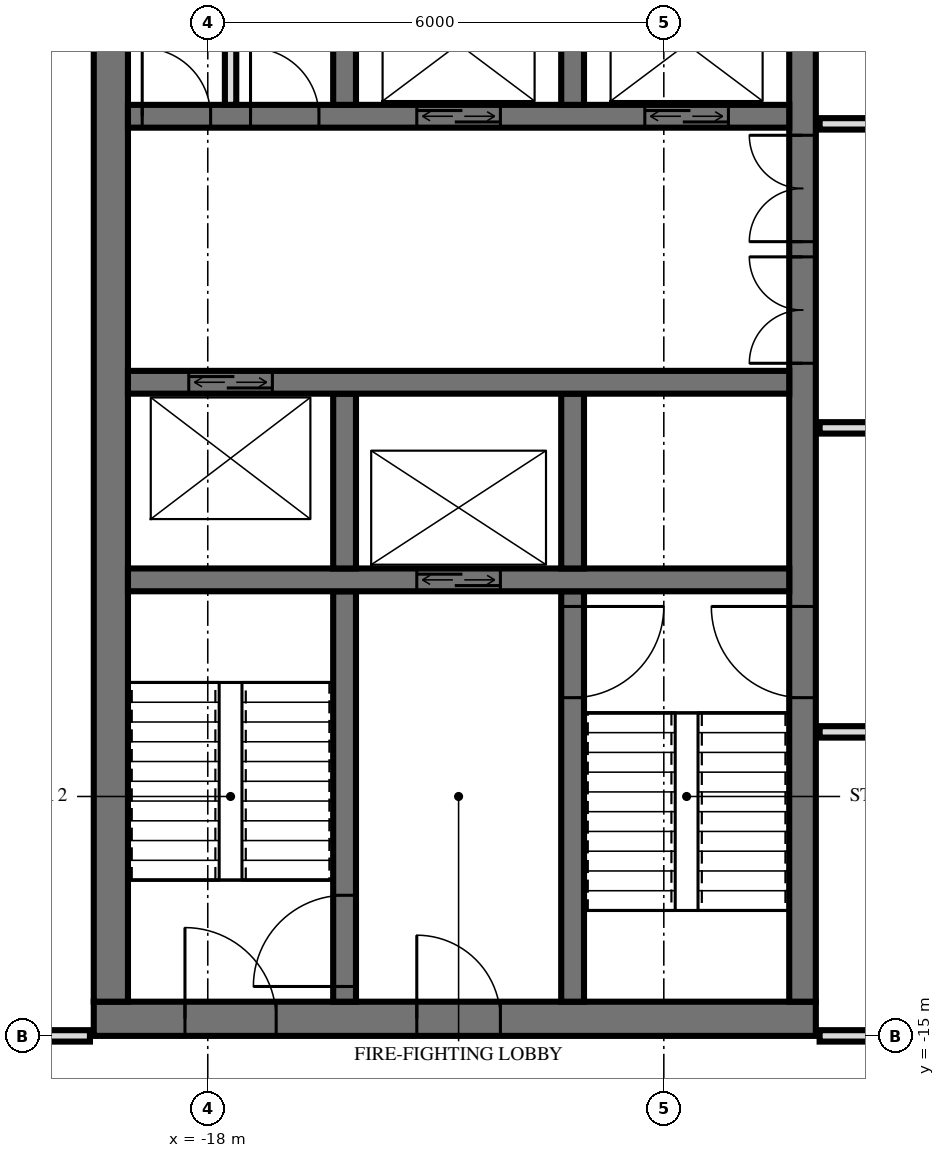
"""IFC4 building model, lengths in metres.
Left out: names, types, materials, properties, quantities, classifications, styles, units other than length and angle.
Written with IfcOpenShell. Run it as: python <this file> out.ifc"""

import sys

from ifc_helpers import new_model, si_unit, direction, frame, frame_2d, origin, place, context, subcontext, project, spatial, rectangle, extrude, element, fill, save


model = new_model("IFC4")
c1 = context("Model", 3, precision=1e-05, world=origin(), true_north=direction((0.0, 1.0)))
c2 = subcontext(c1, "Body", "Model", "MODEL_VIEW")
j1 = project(units=[si_unit("LENGTHUNIT", "METRE"), si_unit("PLANEANGLEUNIT", "RADIAN")], contexts=[c1])
p1 = place(None, origin())
s1 = spatial("IfcSite", under=j1, at=p1, CompositionType="ELEMENT")
p2 = place(p1, origin())
s2 = spatial("IfcBuilding", under=s1, at=p2, CompositionType="ELEMENT")
p3 = place(p2, frame((0.0, 0.0, 334.6)))
s3 = spatial("IfcBuildingStorey", under=s2, at=p3, CompositionType="ELEMENT", Elevation=334.6)
p4 = place(p3, frame((-19.5, -14.775, 0.0), z_axis=(0.0, 0.0, 1.0), x_axis=(1.0, 0.0, 0.0)))
e1 = element("IfcWall", 1, at=p4, inside=s3, PredefinedType="SHEAR", context=c2, shape_type="SweptSolid", body=[
    extrude(rectangle(XDim=9.5, YDim=0.45, at=frame_2d((4.75, 0.0))), origin(), (0.0, 0.0, 1.0), 4.0),
])
p5 = place(p4, frame((1.2, 0.0, 0.0)))
e2 = element("IfcOpeningElement", 2, at=p5, cuts=e1, PredefinedType="OPENING", context=c2, shape_type="SweptSolid", body=[
    extrude(rectangle(XDim=1.2, YDim=2.1, at=frame_2d((0.6, 1.05))), frame((0.0, 0.235, 0.0), z_axis=(0.0, -1.0, 0.0), x_axis=(1.0, 0.0, 0.0)), (0.0, 0.0, 1.0), 0.47),
])
p6 = place(p4, frame((4.25, 0.0, 0.0)))
e3 = element("IfcOpeningElement", 3, at=p6, cuts=e1, PredefinedType="OPENING", context=c2, shape_type="SweptSolid", body=[
    extrude(rectangle(XDim=1.1, YDim=2.1, at=frame_2d((0.55, 1.05))), frame((0.0, 0.235, 0.0), z_axis=(0.0, -1.0, 0.0), x_axis=(1.0, 0.0, 0.0)), (0.0, 0.0, 1.0), 0.47),
])
p7 = place(p3, frame((-10.175, -14.55, 0.0), z_axis=(0.0, 0.0, 1.0), x_axis=(0.0, 1.0, 0.0)))
e4 = element("IfcWall", 4, at=p7, inside=s3, PredefinedType="SHEAR", context=c2, shape_type="SweptSolid", body=[
    extrude(rectangle(XDim=14.1, YDim=0.35, at=frame_2d((7.05, 0.0))), origin(), (0.0, 0.0, 1.0), 4.0),
])
p8 = place(p7, frame((8.4, 0.0, 0.0)))
e5 = element("IfcOpeningElement", 5, at=p8, cuts=e4, PredefinedType="OPENING", context=c2, shape_type="SweptSolid", body=[
    extrude(rectangle(XDim=1.4, YDim=2.4, at=frame_2d((0.7, 1.2))), frame((0.0, 0.185, 0.0), z_axis=(0.0, -1.0, 0.0), x_axis=(1.0, 0.0, 0.0)), (0.0, 0.0, 1.0), 0.37),
])
p9 = place(p7, frame((10.0, 0.0, 0.0)))
e6 = element("IfcOpeningElement", 6, at=p9, cuts=e4, PredefinedType="OPENING", context=c2, shape_type="SweptSolid", body=[
    extrude(rectangle(XDim=1.4, YDim=2.4, at=frame_2d((0.7, 1.2))), frame((0.0, 0.185, 0.0), z_axis=(0.0, -1.0, 0.0), x_axis=(1.0, 0.0, 0.0)), (0.0, 0.0, 1.0), 0.37),
])
p10 = place(p7, frame((4.0, 0.0, 0.0)))
e7 = element("IfcOpeningElement", 7, at=p10, cuts=e4, PredefinedType="OPENING", context=c2, shape_type="SweptSolid", body=[
    extrude(rectangle(XDim=1.2, YDim=2.1, at=frame_2d((0.6, 1.05))), frame((0.0, 0.185, 0.0), z_axis=(0.0, -1.0, 0.0), x_axis=(1.0, 0.0, 0.0)), (0.0, 0.0, 1.0), 0.37),
])
p11 = place(p3, frame((-19.275, -14.55, 0.0), z_axis=(0.0, 0.0, 1.0), x_axis=(0.0, 1.0, 0.0)))
e8 = element("IfcWall", 8, at=p11, inside=s3, PredefinedType="SHEAR", context=c2, shape_type="SweptSolid", body=[
    extrude(rectangle(XDim=14.1, YDim=0.45, at=frame_2d((7.05, 0.0))), origin(), (0.0, 0.0, 1.0), 4.0),
])
p12 = place(p3, frame((-19.05, -2.9, 0.0), z_axis=(0.0, 0.0, 1.0), x_axis=(1.0, 0.0, 0.0)))
e9 = element("IfcWall", 9, at=p12, inside=s3, PredefinedType="SHEAR", context=c2, shape_type="SweptSolid", body=[
    extrude(rectangle(XDim=8.7, YDim=0.3, at=frame_2d((4.35, 0.0))), origin(), (0.0, 0.0, 1.0), 4.0),
])
p13 = place(p12, frame((6.8, 0.0, 0.0)))
e10 = element("IfcOpeningElement", 10, at=p13, cuts=e9, PredefinedType="OPENING", context=c2, shape_type="SweptSolid", body=[
    extrude(rectangle(XDim=1.1, YDim=2.1, at=frame_2d((0.55, 1.05))), frame((0.0, 0.16, 0.0), z_axis=(0.0, -1.0, 0.0), x_axis=(1.0, 0.0, 0.0)), (0.0, 0.0, 1.0), 0.32),
])
p14 = place(p12, frame((3.8, 0.0, 0.0)))
e11 = element("IfcOpeningElement", 11, at=p14, cuts=e9, PredefinedType="OPENING", context=c2, shape_type="SweptSolid", body=[
    extrude(rectangle(XDim=1.1, YDim=2.1, at=frame_2d((0.55, 1.05))), frame((0.0, 0.16, 0.0), z_axis=(0.0, -1.0, 0.0), x_axis=(1.0, 0.0, 0.0)), (0.0, 0.0, 1.0), 0.32),
])
p15 = place(p12, frame((1.613, 0.0, 0.0)))
e12 = element("IfcOpeningElement", 12, at=p15, cuts=e9, PredefinedType="OPENING", context=c2, shape_type="SweptSolid", body=[
    extrude(rectangle(XDim=0.9, YDim=2.1, at=frame_2d((0.45, 1.05))), frame((0.0, 0.16, 0.0), z_axis=(0.0, -1.0, 0.0), x_axis=(1.0, 0.0, 0.0)), (0.0, 0.0, 1.0), 0.32),
])
p16 = place(p12, frame((0.188, 0.0, 0.0)))
e13 = element("IfcOpeningElement", 13, at=p16, cuts=e9, PredefinedType="OPENING", context=c2, shape_type="SweptSolid", body=[
    extrude(rectangle(XDim=0.9, YDim=2.1, at=frame_2d((0.45, 1.05))), frame((0.0, 0.16, 0.0), z_axis=(0.0, -1.0, 0.0), x_axis=(1.0, 0.0, 0.0)), (0.0, 0.0, 1.0), 0.32),
])
p17 = place(p3, frame((-19.05, -6.4, 0.0), z_axis=(0.0, 0.0, 1.0), x_axis=(1.0, 0.0, 0.0)))
e14 = element("IfcWall", 14, at=p17, inside=s3, PredefinedType="SHEAR", context=c2, shape_type="SweptSolid", body=[
    extrude(rectangle(XDim=8.7, YDim=0.3, at=frame_2d((4.35, 0.0))), origin(), (0.0, 0.0, 1.0), 4.0),
])
p18 = place(p17, frame((0.8, 0.0, 0.0)))
e15 = element("IfcOpeningElement", 15, at=p18, cuts=e14, PredefinedType="OPENING", context=c2, shape_type="SweptSolid", body=[
    extrude(rectangle(XDim=1.1, YDim=2.1, at=frame_2d((0.55, 1.05))), frame((0.0, 0.16, 0.0), z_axis=(0.0, -1.0, 0.0), x_axis=(1.0, 0.0, 0.0)), (0.0, 0.0, 1.0), 0.32),
])
p19 = place(p3, frame((-19.05, -9.0, 0.0), z_axis=(0.0, 0.0, 1.0), x_axis=(1.0, 0.0, 0.0)))
e16 = element("IfcWall", 16, at=p19, inside=s3, PredefinedType="SHEAR", context=c2, shape_type="SweptSolid", body=[
    extrude(rectangle(XDim=8.7, YDim=0.3, at=frame_2d((4.35, 0.0))), origin(), (0.0, 0.0, 1.0), 4.0),
])
p20 = place(p19, frame((3.8, 0.0, 0.0)))
e17 = element("IfcOpeningElement", 17, at=p20, cuts=e16, PredefinedType="OPENING", context=c2, shape_type="SweptSolid", body=[
    extrude(rectangle(XDim=1.1, YDim=2.1, at=frame_2d((0.55, 1.05))), frame((0.0, 0.16, 0.0), z_axis=(0.0, -1.0, 0.0), x_axis=(1.0, 0.0, 0.0)), (0.0, 0.0, 1.0), 0.32),
])
for number, where, z_axis, x_axis in (
    (18, (-13.2, -2.75, 0.0), (0.0, 0.0, 1.0), (0.0, 1.0, 0.0)),
    (19, (-13.2, -8.85, 0.0), (0.0, 0.0, 1.0), (0.0, 1.0, 0.0)),
):
    element("IfcWall", number, at=place(p3, frame(where, z_axis=z_axis, x_axis=x_axis)), inside=s3, PredefinedType="SHEAR", context=c2, shape_type="SweptSolid", body=[
        extrude(rectangle(XDim=2.3, YDim=0.3, at=frame_2d((1.15, 0.0))), origin(), (0.0, 0.0, 1.0), 4.0),
    ])
p21 = place(p3, frame((-13.2, -14.55, 0.0), z_axis=(0.0, 0.0, 1.0), x_axis=(0.0, 1.0, 0.0)))
e20 = element("IfcWall", 20, at=p21, inside=s3, PredefinedType="SHEAR", context=c2, shape_type="SweptSolid", body=[
    extrude(rectangle(XDim=5.4, YDim=0.3, at=frame_2d((2.7, 0.0))), origin(), (0.0, 0.0, 1.0), 4.0),
])
p22 = place(p21, frame((4.0, 0.0, 0.0)))
e21 = element("IfcOpeningElement", 21, at=p22, cuts=e20, PredefinedType="OPENING", context=c2, shape_type="SweptSolid", body=[
    extrude(rectangle(XDim=1.2, YDim=2.1, at=frame_2d((0.6, 1.05))), frame((0.0, 0.16, 0.0), z_axis=(0.0, -1.0, 0.0), x_axis=(1.0, 0.0, 0.0)), (0.0, 0.0, 1.0), 0.32),
])
for number, where, z_axis, x_axis in (
    (22, (-16.2, -2.75, 0.0), (0.0, 0.0, 1.0), (0.0, 1.0, 0.0)),
    (23, (-16.2, -8.85, 0.0), (0.0, 0.0, 1.0), (0.0, 1.0, 0.0)),
):
    element("IfcWall", number, at=place(p3, frame(where, z_axis=z_axis, x_axis=x_axis)), inside=s3, PredefinedType="SHEAR", context=c2, shape_type="SweptSolid", body=[
        extrude(rectangle(XDim=2.3, YDim=0.3, at=frame_2d((1.15, 0.0))), origin(), (0.0, 0.0, 1.0), 4.0),
    ])
p23 = place(p3, frame((-16.2, -14.55, 0.0), z_axis=(0.0, 0.0, 1.0), x_axis=(0.0, 1.0, 0.0)))
e24 = element("IfcWall", 24, at=p23, inside=s3, PredefinedType="SHEAR", context=c2, shape_type="SweptSolid", body=[
    extrude(rectangle(XDim=5.4, YDim=0.3, at=frame_2d((2.7, 0.0))), origin(), (0.0, 0.0, 1.0), 4.0),
])
p24 = place(p23, frame((0.2, 0.0, 0.0)))
e25 = element("IfcOpeningElement", 25, at=p24, cuts=e24, PredefinedType="OPENING", context=c2, shape_type="SweptSolid", body=[
    extrude(rectangle(XDim=1.2, YDim=2.1, at=frame_2d((0.6, 1.05))), frame((0.0, 0.16, 0.0), z_axis=(0.0, -1.0, 0.0), x_axis=(1.0, 0.0, 0.0)), (0.0, 0.0, 1.0), 0.32),
])
p25 = place(p3, frame((-17.7, -2.75, 0.0), z_axis=(0.0, 0.0, 1.0), x_axis=(0.0, 1.0, 0.0)))
e26 = element("IfcWall", 26, at=p25, inside=s3, PredefinedType="PARTITIONING", context=c2, shape_type="SweptSolid", body=[
    extrude(rectangle(XDim=2.3, YDim=0.15, at=frame_2d((1.15, 0.0))), origin(), (0.0, 0.0, 1.0), 3.7),
])
p26 = place(p3, frame((-21.935, -15.0, 0.0), z_axis=(0.0, 0.0, 1.0), x_axis=(1.0, 0.0, 0.0)))
e27 = element("IfcWall", 27, at=p26, inside=s3, PredefinedType="PARTITIONING", context=c2, shape_type="SweptSolid", body=[
    extrude(rectangle(XDim=2.385, YDim=0.15, at=frame_2d((1.192, 0.0))), origin(), (0.0, 0.0, 1.0), 3.72),
])
p27 = place(p26, frame((0.627, 0.0, 0.0)))
e28 = element("IfcOpeningElement", 28, at=p27, cuts=e27, PredefinedType="OPENING", context=c2, shape_type="SweptSolid", body=[
    extrude(rectangle(XDim=1.0, YDim=2.1, at=frame_2d((0.5, 1.05))), frame((0.0, 0.085, 0.0), z_axis=(0.0, -1.0, 0.0), x_axis=(1.0, 0.0, 0.0)), (0.0, 0.0, 1.0), 0.17),
])
p28 = place(p3, frame((-9.95, -15.0, 0.0), z_axis=(0.0, 0.0, 1.0), x_axis=(1.0, 0.0, 0.0)))
e29 = element("IfcWall", 29, at=p28, inside=s3, PredefinedType="PARTITIONING", context=c2, shape_type="SweptSolid", body=[
    extrude(rectangle(XDim=2.642, YDim=0.15, at=frame_2d((1.321, 0.0))), origin(), (0.0, 0.0, 1.0), 3.084),
])
p29 = place(p3, frame((-9.95, -11.0, 0.0), z_axis=(0.0, 0.0, 1.0), x_axis=(1.0, 0.0, 0.0)))
e30 = element("IfcWall", 30, at=p29, inside=s3, PredefinedType="PARTITIONING", context=c2, shape_type="SweptSolid", body=[
    extrude(rectangle(XDim=19.9, YDim=0.15, at=frame_2d((9.95, 0.0))), origin(), (0.0, 0.0, 1.0), 3.72),
])
p30 = place(p29, frame((9.45, 0.0, 0.0)))
e31 = element("IfcOpeningElement", 31, at=p30, cuts=e30, PredefinedType="OPENING", context=c2, shape_type="SweptSolid", body=[
    extrude(rectangle(XDim=1.0, YDim=2.1, at=frame_2d((0.5, 1.05))), frame((0.0, 0.085, 0.0), z_axis=(0.0, -1.0, 0.0), x_axis=(1.0, 0.0, 0.0)), (0.0, 0.0, 1.0), 0.17),
])
p31 = place(p29, frame((16.7, 0.0, 0.0)))
e32 = element("IfcOpeningElement", 32, at=p31, cuts=e30, PredefinedType="OPENING", context=c2, shape_type="SweptSolid", body=[
    extrude(rectangle(XDim=1.0, YDim=2.1, at=frame_2d((0.5, 1.05))), frame((0.0, 0.085, 0.0), z_axis=(0.0, -1.0, 0.0), x_axis=(1.0, 0.0, 0.0)), (0.0, 0.0, 1.0), 0.17),
])
p32 = place(p3, frame((-9.95, -7.0, 0.0), z_axis=(0.0, 0.0, 1.0), x_axis=(1.0, 0.0, 0.0)))
e33 = element("IfcWall", 33, at=p32, inside=s3, PredefinedType="PARTITIONING", context=c2, shape_type="SweptSolid", body=[
    extrude(rectangle(XDim=19.9, YDim=0.15, at=frame_2d((9.95, 0.0))), origin(), (0.0, 0.0, 1.0), 3.72),
])
p33 = place(p32, frame((9.45, 0.0, 0.0)))
e34 = element("IfcOpeningElement", 34, at=p33, cuts=e33, PredefinedType="OPENING", context=c2, shape_type="SweptSolid", body=[
    extrude(rectangle(XDim=1.0, YDim=2.1, at=frame_2d((0.5, 1.05))), frame((0.0, 0.085, 0.0), z_axis=(0.0, -1.0, 0.0), x_axis=(1.0, 0.0, 0.0)), (0.0, 0.0, 1.0), 0.17),
])
p34 = place(p32, frame((2.2, 0.0, 0.0)))
e35 = element("IfcOpeningElement", 35, at=p34, cuts=e33, PredefinedType="OPENING", context=c2, shape_type="SweptSolid", body=[
    extrude(rectangle(XDim=1.0, YDim=2.1, at=frame_2d((0.5, 1.05))), frame((0.0, 0.085, 0.0), z_axis=(0.0, -1.0, 0.0), x_axis=(1.0, 0.0, 0.0)), (0.0, 0.0, 1.0), 0.17),
])
p35 = place(p3, frame((-9.95, -3.0, 0.0), z_axis=(0.0, 0.0, 1.0), x_axis=(1.0, 0.0, 0.0)))
e36 = element("IfcWall", 36, at=p35, inside=s3, PredefinedType="PARTITIONING", context=c2, shape_type="SweptSolid", body=[
    extrude(rectangle(XDim=19.9, YDim=0.15, at=frame_2d((9.95, 0.0))), origin(), (0.0, 0.0, 1.0), 3.72),
])
p36 = place(p35, frame((0.95, 0.0, 0.0)))
e37 = element("IfcOpeningElement", 37, at=p36, cuts=e36, PredefinedType="OPENING", context=c2, shape_type="SweptSolid", body=[
    extrude(rectangle(XDim=1.0, YDim=2.1, at=frame_2d((0.5, 1.05))), frame((0.0, 0.085, 0.0), z_axis=(0.0, -1.0, 0.0), x_axis=(1.0, 0.0, 0.0)), (0.0, 0.0, 1.0), 0.17),
])
p37 = place(p35, frame((3.7, 0.0, 0.0)))
e38 = element("IfcOpeningElement", 38, at=p37, cuts=e36, PredefinedType="OPENING", context=c2, shape_type="SweptSolid", body=[
    extrude(rectangle(XDim=1.0, YDim=2.1, at=frame_2d((0.5, 1.05))), frame((0.0, 0.085, 0.0), z_axis=(0.0, -1.0, 0.0), x_axis=(1.0, 0.0, 0.0)), (0.0, 0.0, 1.0), 0.17),
])
p38 = place(p35, frame((8.7, 0.0, 0.0)))
e39 = element("IfcOpeningElement", 39, at=p38, cuts=e36, PredefinedType="OPENING", context=c2, shape_type="SweptSolid", body=[
    extrude(rectangle(XDim=1.0, YDim=2.1, at=frame_2d((0.5, 1.05))), frame((0.0, 0.085, 0.0), z_axis=(0.0, -1.0, 0.0), x_axis=(1.0, 0.0, 0.0)), (0.0, 0.0, 1.0), 0.17),
])
p39 = place(p35, frame((15.95, 0.0, 0.0)))
e40 = element("IfcOpeningElement", 40, at=p39, cuts=e36, PredefinedType="OPENING", context=c2, shape_type="SweptSolid", body=[
    extrude(rectangle(XDim=1.0, YDim=2.1, at=frame_2d((0.5, 1.05))), frame((0.0, 0.085, 0.0), z_axis=(0.0, -1.0, 0.0), x_axis=(1.0, 0.0, 0.0)), (0.0, 0.0, 1.0), 0.17),
])
p40 = place(p13, origin())
e41 = element("IfcDoor", 41, at=p40, inside=s3, OperationType="DOUBLE_DOOR_SLIDING", PredefinedType="USERDEFINED", context=c2, shape_type="SweptSolid", body=[
    extrude(rectangle(XDim=1.1, YDim=2.1, at=frame_2d((0.55, 1.05))), frame((0.0, 0.025, 0.0), z_axis=(0.0, -1.0, 0.0), x_axis=(1.0, 0.0, 0.0)), (0.0, 0.0, 1.0), 0.05),
])
fill(e10, e41)
p41 = place(p14, origin())
e42 = element("IfcDoor", 42, at=p41, inside=s3, OperationType="DOUBLE_DOOR_SLIDING", PredefinedType="USERDEFINED", context=c2, shape_type="SweptSolid", body=[
    extrude(rectangle(XDim=1.1, YDim=2.1, at=frame_2d((0.55, 1.05))), frame((0.0, 0.025, 0.0), z_axis=(0.0, -1.0, 0.0), x_axis=(1.0, 0.0, 0.0)), (0.0, 0.0, 1.0), 0.05),
])
fill(e11, e42)
p42 = place(p20, origin())
e43 = element("IfcDoor", 43, at=p42, inside=s3, OperationType="DOUBLE_DOOR_SLIDING", PredefinedType="USERDEFINED", context=c2, shape_type="SweptSolid", body=[
    extrude(rectangle(XDim=1.1, YDim=2.1, at=frame_2d((0.55, 1.05))), frame((0.0, 0.025, 0.0), z_axis=(0.0, -1.0, 0.0), x_axis=(1.0, 0.0, 0.0)), (0.0, 0.0, 1.0), 0.05),
])
fill(e17, e43)
p43 = place(p18, origin())
e44 = element("IfcDoor", 44, at=p43, inside=s3, OperationType="DOUBLE_DOOR_SLIDING", PredefinedType="USERDEFINED", context=c2, shape_type="SweptSolid", body=[
    extrude(rectangle(XDim=1.1, YDim=2.1, at=frame_2d((0.55, 1.05))), frame((0.0, 0.025, 0.0), z_axis=(0.0, -1.0, 0.0), x_axis=(1.0, 0.0, 0.0)), (0.0, 0.0, 1.0), 0.05),
])
fill(e15, e44)
p44 = place(p8, origin())
e45 = element("IfcDoor", 45, at=p44, inside=s3, OperationType="DOUBLE_DOOR_SINGLE_SWING", PredefinedType="DOOR", context=c2, shape_type="SweptSolid", body=[
    extrude(rectangle(XDim=1.4, YDim=2.4, at=frame_2d((0.7, 1.2))), frame((0.0, 0.025, 0.0), z_axis=(0.0, -1.0, 0.0), x_axis=(1.0, 0.0, 0.0)), (0.0, 0.0, 1.0), 0.05),
])
fill(e5, e45)
p45 = place(p9, origin())
e46 = element("IfcDoor", 46, at=p45, inside=s3, OperationType="DOUBLE_DOOR_SINGLE_SWING", PredefinedType="DOOR", context=c2, shape_type="SweptSolid", body=[
    extrude(rectangle(XDim=1.4, YDim=2.4, at=frame_2d((0.7, 1.2))), frame((0.0, 0.025, 0.0), z_axis=(0.0, -1.0, 0.0), x_axis=(1.0, 0.0, 0.0)), (0.0, 0.0, 1.0), 0.05),
])
fill(e6, e46)
p46 = place(p10, origin())
e47 = element("IfcDoor", 47, at=p46, inside=s3, OperationType="SINGLE_SWING_LEFT", PredefinedType="DOOR", context=c2, shape_type="SweptSolid", body=[
    extrude(rectangle(XDim=1.2, YDim=2.1, at=frame_2d((0.6, 1.05))), frame((0.0, 0.025, 0.0), z_axis=(0.0, -1.0, 0.0), x_axis=(1.0, 0.0, 0.0)), (0.0, 0.0, 1.0), 0.05),
])
fill(e7, e47)
p47 = place(p5, origin())
e48 = element("IfcDoor", 48, at=p47, inside=s3, OperationType="SINGLE_SWING_RIGHT", PredefinedType="DOOR", context=c2, shape_type="SweptSolid", body=[
    extrude(rectangle(XDim=1.2, YDim=2.1, at=frame_2d((0.6, 1.05))), frame((0.0, 0.025, 0.0), z_axis=(0.0, -1.0, 0.0), x_axis=(1.0, 0.0, 0.0)), (0.0, 0.0, 1.0), 0.05),
])
fill(e2, e48)
p48 = place(p6, origin())
e49 = element("IfcDoor", 49, at=p48, inside=s3, OperationType="SINGLE_SWING_RIGHT", PredefinedType="DOOR", context=c2, shape_type="SweptSolid", body=[
    extrude(rectangle(XDim=1.1, YDim=2.1, at=frame_2d((0.55, 1.05))), frame((0.0, 0.025, 0.0), z_axis=(0.0, -1.0, 0.0), x_axis=(1.0, 0.0, 0.0)), (0.0, 0.0, 1.0), 0.05),
])
fill(e3, e49)
p49 = place(p15, origin())
e50 = element("IfcDoor", 50, at=p49, inside=s3, OperationType="SINGLE_SWING_RIGHT", PredefinedType="DOOR", context=c2, shape_type="SweptSolid", body=[
    extrude(rectangle(XDim=0.9, YDim=2.1, at=frame_2d((0.45, 1.05))), frame((0.0, 0.025, 0.0), z_axis=(0.0, -1.0, 0.0), x_axis=(1.0, 0.0, 0.0)), (0.0, 0.0, 1.0), 0.05),
])
fill(e12, e50)
p50 = place(p16, origin())
e51 = element("IfcDoor", 51, at=p50, inside=s3, OperationType="SINGLE_SWING_RIGHT", PredefinedType="DOOR", context=c2, shape_type="SweptSolid", body=[
    extrude(rectangle(XDim=0.9, YDim=2.1, at=frame_2d((0.45, 1.05))), frame((0.0, 0.025, 0.0), z_axis=(0.0, -1.0, 0.0), x_axis=(1.0, 0.0, 0.0)), (0.0, 0.0, 1.0), 0.05),
])
fill(e13, e51)
p51 = place(p22, frame((0.6, 0.0, 0.0), z_axis=(0.0, 0.0, 1.0), x_axis=(-1.0, 0.0, 0.0)))
e52 = element("IfcDoor", 52, at=p51, inside=s3, OperationType="SINGLE_SWING_RIGHT", PredefinedType="DOOR", context=c2, shape_type="SweptSolid", body=[
    extrude(rectangle(XDim=1.2, YDim=2.1, at=frame_2d((0.0, 1.05))), frame((0.0, -0.025, 0.0), z_axis=(0.0, 1.0, 0.0), x_axis=(-1.0, 0.0, 0.0)), (0.0, 0.0, 1.0), 0.05),
])
fill(e21, e52)
p52 = place(p24, origin())
e53 = element("IfcDoor", 53, at=p52, inside=s3, OperationType="SINGLE_SWING_RIGHT", PredefinedType="DOOR", context=c2, shape_type="SweptSolid", body=[
    extrude(rectangle(XDim=1.2, YDim=2.1, at=frame_2d((0.6, 1.05))), frame((0.0, 0.025, 0.0), z_axis=(0.0, -1.0, 0.0), x_axis=(1.0, 0.0, 0.0)), (0.0, 0.0, 1.0), 0.05),
])
fill(e25, e53)
save(model, sys.argv[1])
